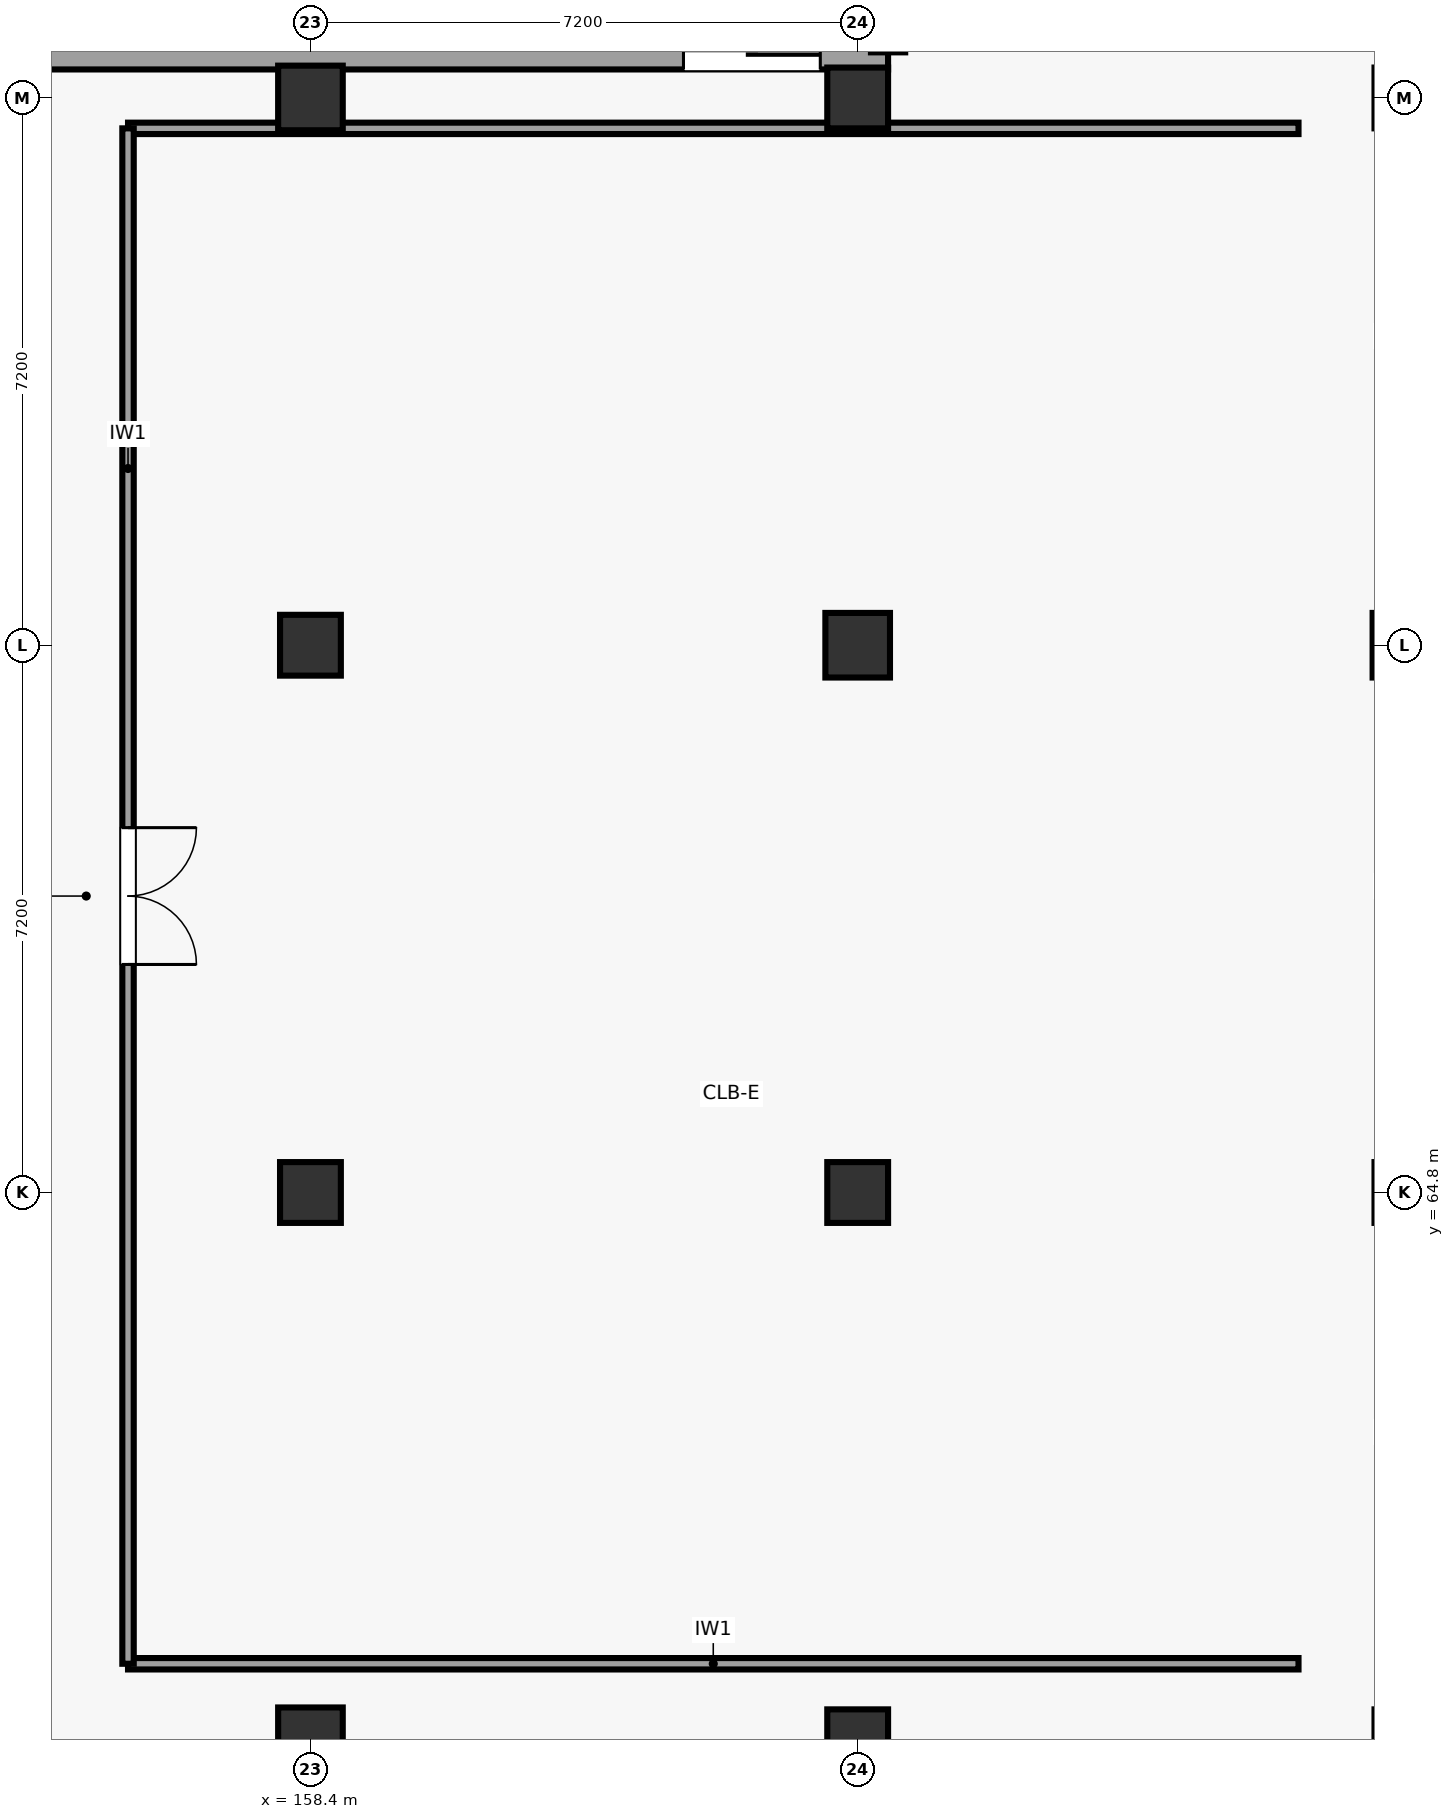
"""IFC4 building model, lengths in metres.
Left out: names, types, materials, properties, quantities, classifications, styles, units other than length and angle.
Written with IfcOpenShell. Run it as: python <this file> out.ifc"""

import sys

from ifc_helpers import new_model, si_unit, direction, frame, frame_2d, origin, origin_2d, place, context, subcontext, project, spatial, rectangle, circle, extrude, element, fill, save


model = new_model("IFC4")
c1 = context("Model", 3, precision=1e-05, world=origin(), true_north=direction((0.0, 1.0)))
c2 = subcontext(c1, "Body", "Model", "MODEL_VIEW")
j1 = project(units=[si_unit("LENGTHUNIT", "METRE"), si_unit("PLANEANGLEUNIT", "RADIAN")], contexts=[c1])
p1 = place(None, origin())
s1 = spatial("IfcSite", under=j1, at=p1, CompositionType="ELEMENT")
p2 = place(p1, origin())
s2 = spatial("IfcBuilding", under=s1, at=p2, CompositionType="ELEMENT")
p3 = place(p2, frame((0.0, 0.0, 5.4)))
s3 = spatial("IfcBuildingStorey", under=s2, at=p3, CompositionType="ELEMENT", Elevation=5.4)
p4 = place(p3, frame((158.4, 57.6, 0.0), z_axis=(0.0, 0.0, 1.0), x_axis=(1.0, 0.0, 0.0)))
e1 = element("IfcColumn", 1, at=p4, inside=s3, PredefinedType="COLUMN", context=c2, shape_type="SweptSolid", body=[
    extrude(rectangle(XDim=0.85, YDim=0.85, at=origin_2d()), origin(), (0.0, 0.0, 1.0), 4.2),
])
p5 = place(p3, frame((158.4, 64.8, 0.0), z_axis=(0.0, 0.0, 1.0), x_axis=(1.0, 0.0, 0.0)))
e2 = element("IfcColumn", 2, at=p5, inside=s3, PredefinedType="COLUMN", context=c2, shape_type="SweptSolid", body=[
    extrude(rectangle(XDim=0.8, YDim=0.8, at=origin_2d()), origin(), (0.0, 0.0, 1.0), 4.2),
])
p6 = place(p3, frame((158.4, 72.0, 0.0), z_axis=(0.0, 0.0, 1.0), x_axis=(1.0, 0.0, 0.0)))
e3 = element("IfcColumn", 3, at=p6, inside=s3, PredefinedType="COLUMN", context=c2, shape_type="SweptSolid", body=[
    extrude(circle(Radius=0.4, at=origin_2d()), origin(), (0.0, 0.0, 1.0), 4.2),
])
p7 = place(p3, frame((158.4, 79.2, 0.0), z_axis=(0.0, 0.0, 1.0), x_axis=(1.0, 0.0, 0.0)))
e4 = element("IfcColumn", 4, at=p7, inside=s3, PredefinedType="COLUMN", context=c2, shape_type="SweptSolid", body=[
    extrude(rectangle(XDim=0.85, YDim=0.85, at=origin_2d()), origin(), (0.0, 0.0, 1.0), 4.2),
])
p8 = place(p3, frame((165.6, 57.6, 0.0), z_axis=(0.0, 0.0, 1.0), x_axis=(1.0, 0.0, 0.0)))
e5 = element("IfcColumn", 5, at=p8, inside=s3, PredefinedType="COLUMN", context=c2, shape_type="SweptSolid", body=[
    extrude(rectangle(XDim=0.8, YDim=0.8, at=origin_2d()), origin(), (0.0, 0.0, 1.0), 4.2),
])
p9 = place(p3, frame((165.6, 64.8, 0.0), z_axis=(0.0, 0.0, 1.0), x_axis=(1.0, 0.0, 0.0)))
e6 = element("IfcColumn", 6, at=p9, inside=s3, PredefinedType="COLUMN", context=c2, shape_type="SweptSolid", body=[
    extrude(circle(Radius=0.4, at=origin_2d()), origin(), (0.0, 0.0, 1.0), 4.2),
])
p10 = place(p3, frame((165.6, 72.0, 0.0), z_axis=(0.0, 0.0, 1.0), x_axis=(1.0, 0.0, 0.0)))
e7 = element("IfcColumn", 7, at=p10, inside=s3, PredefinedType="COLUMN", context=c2, shape_type="SweptSolid", body=[
    extrude(rectangle(XDim=0.85, YDim=0.85, at=origin_2d()), origin(), (0.0, 0.0, 1.0), 4.2),
])
p11 = place(p3, frame((165.6, 79.2, 0.0), z_axis=(0.0, 0.0, 1.0), x_axis=(1.0, 0.0, 0.0)))
e8 = element("IfcColumn", 8, at=p11, inside=s3, PredefinedType="COLUMN", context=c2, shape_type="SweptSolid", body=[
    extrude(rectangle(XDim=0.8, YDim=0.8, at=origin_2d()), origin(), (0.0, 0.0, 1.0), 4.2),
])
p12 = place(p3, frame((172.8, 72.0, 0.0), z_axis=(0.0, 0.0, 1.0), x_axis=(1.0, 0.0, 0.0)))
e9 = element("IfcColumn", 9, at=p12, inside=s3, PredefinedType="COLUMN", context=c2, shape_type="SweptSolid", body=[
    extrude(rectangle(XDim=0.85, YDim=0.85, at=origin_2d()), origin(), (0.0, 0.0, 1.0), 4.2),
])
p13 = place(p3, frame((153.2, 79.8, 0.0), z_axis=(0.0, 0.0, 1.0), x_axis=(1.0, 0.0, 0.0)))
e10 = element("IfcWall", 10, at=p13, inside=s3, PredefinedType="SHEAR", context=c2, shape_type="SweptSolid", body=[
    extrude(rectangle(XDim=12.8, YDim=0.45, at=frame_2d((6.4, 0.0))), origin(), (0.0, 0.0, 1.0), 3.92),
])
p14 = place(p13, frame((0.55, 0.0, 0.0)))
e11 = element("IfcOpeningElement", 11, at=p14, cuts=e10, PredefinedType="OPENING", context=c2, shape_type="SweptSolid", body=[
    extrude(rectangle(XDim=1.2, YDim=2.25, at=frame_2d((0.6, 1.125))), frame((0.0, 0.235, 0.0), z_axis=(0.0, -1.0, 0.0), x_axis=(1.0, 0.0, 0.0)), (0.0, 0.0, 1.0), 0.47),
])
p15 = place(p13, frame((10.108, 0.0, 0.0)))
e12 = element("IfcOpeningElement", 12, at=p15, cuts=e10, PredefinedType="OPENING", context=c2, shape_type="SweptSolid", body=[
    extrude(rectangle(XDim=1.8, YDim=2.4, at=frame_2d((0.9, 1.2))), frame((0.0, 0.235, 0.0), z_axis=(0.0, -1.0, 0.0), x_axis=(1.0, 0.0, 0.0)), (0.0, 0.0, 1.0), 0.47),
])
p16 = place(p3, frame((166.0, 79.8, 0.0), z_axis=(0.0, 0.0, 1.0), x_axis=(0.0, 1.0, 0.0)))
e13 = element("IfcWall", 13, at=p16, inside=s3, PredefinedType="SHEAR", context=c2, shape_type="SweptSolid", body=[
    extrude(rectangle(XDim=6.1, YDim=0.45, at=frame_2d((3.05, 0.0))), origin(), (0.0, 0.0, 1.0), 3.92),
])
for number, where, z_axis, x_axis in (
    (14, (156.0, 58.6, 0.0), (0.0, 0.0, 1.0), (1.0, 0.0, 0.0)),
    (15, (171.4, 78.8, 0.0), (0.0, 0.0, 1.0), (-1.0, 0.0, 0.0)),
):
    element("IfcWall", number, at=place(p3, frame(where, z_axis=z_axis, x_axis=x_axis)), inside=s3, PredefinedType="PARTITIONING", context=c2, shape_type="SweptSolid", body=[
        extrude(rectangle(XDim=15.4, YDim=0.15, at=frame_2d((7.7, 0.0))), origin(), (0.0, 0.0, 1.0), 2.98),
    ])
p17 = place(p3, frame((156.0, 78.8, 0.0), z_axis=(0.0, 0.0, 1.0), x_axis=(0.0, -1.0, 0.0)))
e16 = element("IfcWall", 16, at=p17, inside=s3, PredefinedType="PARTITIONING", context=c2, shape_type="SweptSolid", body=[
    extrude(rectangle(XDim=20.2, YDim=0.15, at=frame_2d((10.1, 0.0))), origin(), (0.0, 0.0, 1.0), 2.98),
])
p18 = place(p17, frame((9.2, 0.0, 0.0)))
e17 = element("IfcOpeningElement", 17, at=p18, cuts=e16, PredefinedType="OPENING", context=c2, shape_type="SweptSolid", body=[
    extrude(rectangle(XDim=1.8, YDim=2.3, at=frame_2d((0.9, 1.15))), frame((0.0, 0.085, 0.0), z_axis=(0.0, -1.0, 0.0), x_axis=(1.0, 0.0, 0.0)), (0.0, 0.0, 1.0), 0.17),
])
p19 = place(p15, origin())
e18 = element("IfcDoor", 18, at=p19, inside=s3, OperationType="SLIDING_TO_LEFT", PredefinedType="DOOR", context=c2, shape_type="SweptSolid", body=[
    extrude(rectangle(XDim=1.8, YDim=2.4, at=frame_2d((0.9, 1.2))), frame((0.0, 0.025, 0.0), z_axis=(0.0, -1.0, 0.0), x_axis=(1.0, 0.0, 0.0)), (0.0, 0.0, 1.0), 0.05),
])
fill(e12, e18)
p20 = place(p18, origin())
e19 = element("IfcDoor", 19, at=p20, inside=s3, OperationType="DOUBLE_DOOR_SINGLE_SWING", PredefinedType="DOOR", context=c2, shape_type="SweptSolid", body=[
    extrude(rectangle(XDim=1.8, YDim=2.3, at=frame_2d((0.9, 1.15))), frame((0.0, 0.025, 0.0), z_axis=(0.0, -1.0, 0.0), x_axis=(1.0, 0.0, 0.0)), (0.0, 0.0, 1.0), 0.05),
])
fill(e17, e19)
save(model, sys.argv[1])
